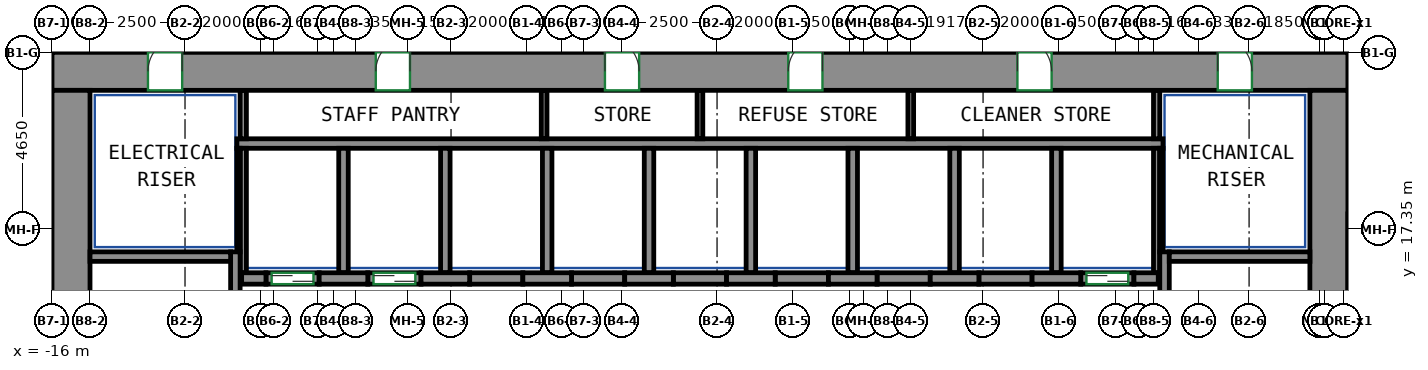
"""IFC4 building model, lengths in metres.
Left out: names, types, materials, properties, quantities, classifications, styles, units other than length and angle.
Written with IfcOpenShell. Run it as: python <this file> out.ifc"""

import sys

from ifc_helpers import new_model, si_unit, direction, frame, frame_2d, origin, place, context, subcontext, project, spatial, rectangle, extrude, source, transform, mapped, element, fill, save


model = new_model("IFC4")
c1 = context("Model", 3, precision=1e-05, world=origin(), true_north=direction((0.0, 1.0)))
c2 = subcontext(c1, "Body", "Model", "MODEL_VIEW")
j1 = project(units=[si_unit("LENGTHUNIT", "METRE"), si_unit("PLANEANGLEUNIT", "RADIAN")], contexts=[c1])
p1 = place(None, origin())
s1 = spatial("IfcSite", under=j1, at=p1, CompositionType="ELEMENT")
p2 = place(p1, origin())
s2 = spatial("IfcBuilding", under=s1, at=p2, CompositionType="ELEMENT")
p3 = place(p2, frame((0.0, 0.0, 67.2)))
s3 = spatial("IfcBuildingStorey", under=s2, at=p3, CompositionType="ELEMENT", Elevation=67.2)
m1 = source(origin(), c2, "Body", "SweptSolid", [
    extrude(rectangle(XDim=34.1, YDim=1.0, at=frame_2d((17.05, 0.0))), origin(), (0.0, 0.0, 1.0), 3.72),
])
p4 = place(p3, frame((-16.0, 21.5, 0.0), z_axis=(0.0, 0.0, 1.0), x_axis=(1.0, 0.0, 0.0)))
e1 = element("IfcWall", 1, at=p4, inside=s3, PredefinedType="SHEAR", context=c2, shape_type="MappedRepresentation", body=[
    mapped(m1, transform((0.0, 0.0, 0.0))),
])
p5 = place(p4, frame((8.52, 0.0, 0.0)))
e2 = element("IfcOpeningElement", 2, at=p5, cuts=e1, PredefinedType="OPENING", context=c2, shape_type="SweptSolid", body=[
    extrude(rectangle(XDim=0.9, YDim=2.1, at=frame_2d((0.45, 1.05))), frame((0.0, 0.51, 0.0), z_axis=(0.0, -1.0, 0.0), x_axis=(1.0, 0.0, 0.0)), (0.0, 0.0, 1.0), 1.02),
])
p6 = place(p4, frame((14.55, 0.0, 0.0)))
e3 = element("IfcOpeningElement", 3, at=p6, cuts=e1, PredefinedType="OPENING", context=c2, shape_type="SweptSolid", body=[
    extrude(rectangle(XDim=0.9, YDim=2.1, at=frame_2d((0.45, 1.05))), frame((0.0, 0.51, 0.0), z_axis=(0.0, -1.0, 0.0), x_axis=(1.0, 0.0, 0.0)), (0.0, 0.0, 1.0), 1.02),
])
p7 = place(p4, frame((19.374, 0.0, 0.0)))
e4 = element("IfcOpeningElement", 4, at=p7, cuts=e1, PredefinedType="OPENING", context=c2, shape_type="SweptSolid", body=[
    extrude(rectangle(XDim=0.9, YDim=2.1, at=frame_2d((0.45, 1.05))), frame((0.0, 0.51, 0.0), z_axis=(0.0, -1.0, 0.0), x_axis=(1.0, 0.0, 0.0)), (0.0, 0.0, 1.0), 1.02),
])
p8 = place(p4, frame((25.404, 0.0, 0.0)))
e5 = element("IfcOpeningElement", 5, at=p8, cuts=e1, PredefinedType="OPENING", context=c2, shape_type="SweptSolid", body=[
    extrude(rectangle(XDim=0.9, YDim=2.1, at=frame_2d((0.45, 1.05))), frame((0.0, 0.51, 0.0), z_axis=(0.0, -1.0, 0.0), x_axis=(1.0, 0.0, 0.0)), (0.0, 0.0, 1.0), 1.02),
])
p9 = place(p4, frame((2.525, 0.0, 0.0)))
e6 = element("IfcOpeningElement", 6, at=p9, cuts=e1, PredefinedType="OPENING", context=c2, shape_type="SweptSolid", body=[
    extrude(rectangle(XDim=0.9, YDim=2.1, at=frame_2d((0.45, 1.05))), frame((0.0, 0.51, 0.0), z_axis=(0.0, -1.0, 0.0), x_axis=(1.0, 0.0, 0.0)), (0.0, 0.0, 1.0), 1.02),
])
p10 = place(p4, frame((30.675, 0.0, 0.0)))
e7 = element("IfcOpeningElement", 7, at=p10, cuts=e1, PredefinedType="OPENING", context=c2, shape_type="SweptSolid", body=[
    extrude(rectangle(XDim=0.9, YDim=2.1, at=frame_2d((0.45, 1.05))), frame((0.0, 0.51, 0.0), z_axis=(0.0, -1.0, 0.0), x_axis=(1.0, 0.0, 0.0)), (0.0, 0.0, 1.0), 1.02),
])
m2 = source(origin(), c2, "Body", "SweptSolid", [
    extrude(rectangle(XDim=12.0, YDim=1.0, at=frame_2d((6.0, 0.0))), origin(), (0.0, 0.0, 1.0), 3.72),
])
for number, where, z_axis, x_axis in (
    (8, (-15.5, 9.0, 0.0), (0.0, 0.0, 1.0), (0.0, 1.0, 0.0)),
    (9, (17.6, 9.0, 0.0), (0.0, 0.0, 1.0), (0.0, 1.0, 0.0)),
):
    element("IfcWall", number, at=place(p3, frame(where, z_axis=z_axis, x_axis=x_axis)), inside=s3, PredefinedType="SHEAR", context=c2, shape_type="MappedRepresentation", body=[
        mapped(m2, transform((0.0, 0.0, 0.0))),
    ])
m3 = source(origin(), c2, "Body", "SweptSolid", [
    extrude(rectangle(XDim=7.75, YDim=0.25, at=frame_2d((3.875, 0.0))), origin(), (0.0, 0.0, 1.0), 3.72),
])
p11 = place(p3, frame((-11.175, 9.0, 0.0), z_axis=(0.0, 0.0, 1.0), x_axis=(0.0, 1.0, 0.0)))
e10 = element("IfcWall", 10, at=p11, inside=s3, PredefinedType="SHEAR", context=c2, shape_type="MappedRepresentation", body=[
    mapped(m3, transform((0.0, 0.0, 0.0))),
])
m4 = source(origin(), c2, "Body", "SweptSolid", [
    extrude(rectangle(XDim=3.7, YDim=0.25, at=frame_2d((1.85, 0.0))), origin(), (0.0, 0.0, 1.0), 3.72),
])
p12 = place(p3, frame((-15.0, 16.625, 0.0), z_axis=(0.0, 0.0, 1.0), x_axis=(1.0, 0.0, 0.0)))
e11 = element("IfcWall", 11, at=p12, inside=s3, PredefinedType="SHEAR", context=c2, shape_type="MappedRepresentation", body=[
    mapped(m4, transform((0.0, 0.0, 0.0))),
])
p13 = place(p3, frame((13.275, 9.0, 0.0), z_axis=(0.0, 0.0, 1.0), x_axis=(0.0, 1.0, 0.0)))
e12 = element("IfcWall", 12, at=p13, inside=s3, PredefinedType="SHEAR", context=c2, shape_type="MappedRepresentation", body=[
    mapped(m3, transform((0.0, 0.0, 0.0))),
])
m5 = source(origin(), c2, "Body", "SweptSolid", [
    extrude(rectangle(XDim=3.7, YDim=0.25, at=frame_2d((1.85, 0.0))), origin(), (0.0, 0.0, 1.0), 3.72),
])
p14 = place(p3, frame((13.4, 16.625, 0.0), z_axis=(0.0, 0.0, 1.0), x_axis=(1.0, 0.0, 0.0)))
e13 = element("IfcWall", 13, at=p14, inside=s3, PredefinedType="SHEAR", context=c2, shape_type="MappedRepresentation", body=[
    mapped(m5, transform((0.0, 0.0, 0.0))),
])
m6 = source(origin(), c2, "Body", "SweptSolid", [
    extrude(rectangle(XDim=0.64, YDim=0.3, at=frame_2d((0.32, 0.0))), origin(), (0.0, 0.0, 1.0), 3.72),
])
p15 = place(p3, frame((-11.01, 16.05, 0.0), z_axis=(0.0, 0.0, 1.0), x_axis=(1.0, 0.0, 0.0)))
e14 = element("IfcWall", 14, at=p15, inside=s3, PredefinedType="SHEAR", context=c2, shape_type="MappedRepresentation", body=[
    mapped(m6, transform((0.0, 0.0, 0.0))),
])
m7 = source(origin(), c2, "Body", "SweptSolid", [
    extrude(rectangle(XDim=1.28, YDim=0.3, at=frame_2d((0.64, 0.0))), origin(), (0.0, 0.0, 1.0), 3.72),
])
for number, where, z_axis, x_axis in (
    (15, (-8.97, 16.05, 0.0), (0.0, 0.0, 1.0), (1.0, 0.0, 0.0)),
    (16, (-6.29, 16.05, 0.0), (0.0, 0.0, 1.0), (1.0, 0.0, 0.0)),
    (17, (-3.61, 16.05, 0.0), (0.0, 0.0, 1.0), (1.0, 0.0, 0.0)),
    (18, (-0.93, 16.05, 0.0), (0.0, 0.0, 1.0), (1.0, 0.0, 0.0)),
    (19, (1.75, 16.05, 0.0), (0.0, 0.0, 1.0), (1.0, 0.0, 0.0)),
    (20, (4.43, 16.05, 0.0), (0.0, 0.0, 1.0), (1.0, 0.0, 0.0)),
):
    element("IfcWall", number, at=place(p3, frame(where, z_axis=z_axis, x_axis=x_axis)), inside=s3, PredefinedType="SHEAR", context=c2, shape_type="MappedRepresentation", body=[
        mapped(m7, transform((0.0, 0.0, 0.0))),
    ])
m8 = source(origin(), c2, "Body", "SweptSolid", [
    extrude(rectangle(XDim=1.28, YDim=0.3, at=frame_2d((0.64, 0.0))), origin(), (0.0, 0.0, 1.0), 3.72),
])
p16 = place(p3, frame((7.11, 16.05, 0.0), z_axis=(0.0, 0.0, 1.0), x_axis=(1.0, 0.0, 0.0)))
e21 = element("IfcWall", 21, at=p16, inside=s3, PredefinedType="SHEAR", context=c2, shape_type="MappedRepresentation", body=[
    mapped(m8, transform((0.0, 0.0, 0.0))),
])
p17 = place(p3, frame((9.79, 16.05, 0.0), z_axis=(0.0, 0.0, 1.0), x_axis=(1.0, 0.0, 0.0)))
e22 = element("IfcWall", 22, at=p17, inside=s3, PredefinedType="SHEAR", context=c2, shape_type="MappedRepresentation", body=[
    mapped(m7, transform((0.0, 0.0, 0.0))),
])
m9 = source(origin(), c2, "Body", "SweptSolid", [
    extrude(rectangle(XDim=0.64, YDim=0.3, at=frame_2d((0.32, 0.0))), origin(), (0.0, 0.0, 1.0), 3.72),
])
p18 = place(p3, frame((12.47, 16.05, 0.0), z_axis=(0.0, 0.0, 1.0), x_axis=(1.0, 0.0, 0.0)))
e23 = element("IfcWall", 23, at=p18, inside=s3, PredefinedType="SHEAR", context=c2, shape_type="MappedRepresentation", body=[
    mapped(m9, transform((0.0, 0.0, 0.0))),
])
m10 = source(origin(), c2, "Body", "SweptSolid", [
    extrude(rectangle(XDim=1.4, YDim=0.3, at=frame_2d((0.7, 0.0))), origin(), (0.0, 0.0, 1.0), 3.72),
])
p19 = place(p3, frame((11.07, 16.05, 0.0), z_axis=(0.0, 0.0, 1.0), x_axis=(1.0, 0.0, 0.0)))
e24 = element("IfcWall", 24, at=p19, inside=s3, PredefinedType="PARTITIONING", context=c2, shape_type="MappedRepresentation", body=[
    mapped(m10, transform((0.0, 0.0, 0.0))),
])
p20 = place(p19, frame((0.15, 0.0, 0.0)))
e25 = element("IfcOpeningElement", 25, at=p20, cuts=e24, PredefinedType="OPENING", context=c2, shape_type="SweptSolid", body=[
    extrude(rectangle(XDim=1.1, YDim=2.1, at=frame_2d((0.55, 1.05))), frame((0.0, 0.16, 0.0), z_axis=(0.0, -1.0, 0.0), x_axis=(1.0, 0.0, 0.0)), (0.0, 0.0, 1.0), 0.32),
])
m11 = source(origin(), c2, "Body", "SweptSolid", [
    extrude(rectangle(XDim=1.4, YDim=0.3, at=frame_2d((0.7, 0.0))), origin(), (0.0, 0.0, 1.0), 3.72),
])
p21 = place(p3, frame((-10.37, 16.05, 0.0), z_axis=(0.0, 0.0, 1.0), x_axis=(1.0, 0.0, 0.0)))
e26 = element("IfcWall", 26, at=p21, inside=s3, PredefinedType="PARTITIONING", context=c2, shape_type="MappedRepresentation", body=[
    mapped(m11, transform((0.0, 0.0, 0.0))),
])
p22 = place(p21, frame((0.15, 0.0, 0.0)))
e27 = element("IfcOpeningElement", 27, at=p22, cuts=e26, PredefinedType="OPENING", context=c2, shape_type="SweptSolid", body=[
    extrude(rectangle(XDim=1.1, YDim=2.1, at=frame_2d((0.55, 1.05))), frame((0.0, 0.16, 0.0), z_axis=(0.0, -1.0, 0.0), x_axis=(1.0, 0.0, 0.0)), (0.0, 0.0, 1.0), 0.32),
])
p23 = place(p3, frame((-7.69, 16.05, 0.0), z_axis=(0.0, 0.0, 1.0), x_axis=(1.0, 0.0, 0.0)))
e28 = element("IfcWall", 28, at=p23, inside=s3, PredefinedType="PARTITIONING", context=c2, shape_type="MappedRepresentation", body=[
    mapped(m10, transform((0.0, 0.0, 0.0))),
])
p24 = place(p23, frame((0.15, 0.0, 0.0)))
e29 = element("IfcOpeningElement", 29, at=p24, cuts=e28, PredefinedType="OPENING", context=c2, shape_type="SweptSolid", body=[
    extrude(rectangle(XDim=1.1, YDim=2.1, at=frame_2d((0.55, 1.05))), frame((0.0, 0.16, 0.0), z_axis=(0.0, -1.0, 0.0), x_axis=(1.0, 0.0, 0.0)), (0.0, 0.0, 1.0), 0.32),
])
p25 = place(p3, frame((-5.01, 16.05, 0.0), z_axis=(0.0, 0.0, 1.0), x_axis=(1.0, 0.0, 0.0)))
e30 = element("IfcWall", 30, at=p25, inside=s3, PredefinedType="PARTITIONING", context=c2, shape_type="MappedRepresentation", body=[
    mapped(m10, transform((0.0, 0.0, 0.0))),
])
p26 = place(p3, frame((-2.33, 16.05, 0.0), z_axis=(0.0, 0.0, 1.0), x_axis=(1.0, 0.0, 0.0)))
e31 = element("IfcWall", 31, at=p26, inside=s3, PredefinedType="PARTITIONING", context=c2, shape_type="MappedRepresentation", body=[
    mapped(m11, transform((0.0, 0.0, 0.0))),
])
for number, where, z_axis, x_axis in (
    (32, (0.35, 16.05, 0.0), (0.0, 0.0, 1.0), (1.0, 0.0, 0.0)),
    (33, (3.03, 16.05, 0.0), (0.0, 0.0, 1.0), (1.0, 0.0, 0.0)),
):
    element("IfcWall", number, at=place(p3, frame(where, z_axis=z_axis, x_axis=x_axis)), inside=s3, PredefinedType="PARTITIONING", context=c2, shape_type="MappedRepresentation", body=[
        mapped(m10, transform((0.0, 0.0, 0.0))),
    ])
for number, where, z_axis, x_axis in (
    (34, (5.71, 16.05, 0.0), (0.0, 0.0, 1.0), (1.0, 0.0, 0.0)),
    (35, (8.39, 16.05, 0.0), (0.0, 0.0, 1.0), (1.0, 0.0, 0.0)),
):
    element("IfcWall", number, at=place(p3, frame(where, z_axis=z_axis, x_axis=x_axis)), inside=s3, PredefinedType="PARTITIONING", context=c2, shape_type="MappedRepresentation", body=[
        mapped(m11, transform((0.0, 0.0, 0.0))),
    ])
m12 = source(origin(), c2, "Body", "SweptSolid", [
    extrude(rectangle(XDim=24.37, YDim=0.25, at=frame_2d((12.185, 0.0))), origin(), (0.0, 0.0, 1.0), 3.72),
])
p27 = place(p3, frame((-11.135, 19.6, 0.0), z_axis=(0.0, 0.0, 1.0), x_axis=(1.0, 0.0, 0.0)))
e36 = element("IfcWall", 36, at=p27, inside=s3, PredefinedType="PARTITIONING", context=c2, shape_type="MappedRepresentation", body=[
    mapped(m12, transform((0.0, 0.0, 0.0))),
])
m13 = source(origin(), c2, "Body", "SweptSolid", [
    extrude(rectangle(XDim=3.275, YDim=0.165, at=frame_2d((1.638, 0.0))), origin(), (0.0, 0.0, 1.0), 3.72),
])
p28 = place(p3, frame((13.067, 16.2, 0.0), z_axis=(0.0, 0.0, 1.0), x_axis=(0.0, 1.0, 0.0)))
e37 = element("IfcWall", 37, at=p28, inside=s3, PredefinedType="PARTITIONING", context=c2, shape_type="MappedRepresentation", body=[
    mapped(m13, transform((0.0, 0.0, 0.0))),
])
m14 = source(origin(), c2, "Body", "SweptSolid", [
    extrude(rectangle(XDim=1.275, YDim=0.165, at=frame_2d((0.637, 0.0))), origin(), (0.0, 0.0, 1.0), 3.72),
])
p29 = place(p3, frame((13.067, 19.725, 0.0), z_axis=(0.0, 0.0, 1.0), x_axis=(0.0, 1.0, 0.0)))
e38 = element("IfcWall", 38, at=p29, inside=s3, PredefinedType="PARTITIONING", context=c2, shape_type="MappedRepresentation", body=[
    mapped(m14, transform((0.0, 0.0, 0.0))),
])
p30 = place(p3, frame((-10.968, 16.2, 0.0), z_axis=(0.0, 0.0, 1.0), x_axis=(0.0, 1.0, 0.0)))
e39 = element("IfcWall", 39, at=p30, inside=s3, PredefinedType="PARTITIONING", context=c2, shape_type="MappedRepresentation", body=[
    mapped(m13, transform((0.0, 0.0, 0.0))),
])
p31 = place(p3, frame((-10.968, 19.725, 0.0), z_axis=(0.0, 0.0, 1.0), x_axis=(0.0, 1.0, 0.0)))
e40 = element("IfcWall", 40, at=p31, inside=s3, PredefinedType="PARTITIONING", context=c2, shape_type="MappedRepresentation", body=[
    mapped(m14, transform((0.0, 0.0, 0.0))),
])
m15 = source(origin(), c2, "Body", "SweptSolid", [
    extrude(rectangle(XDim=3.275, YDim=0.25, at=frame_2d((1.638, 0.0))), origin(), (0.0, 0.0, 1.0), 3.72),
])
p32 = place(p3, frame((10.43, 16.2, 0.0), z_axis=(0.0, 0.0, 1.0), x_axis=(0.0, 1.0, 0.0)))
e41 = element("IfcWall", 41, at=p32, inside=s3, PredefinedType="PARTITIONING", context=c2, shape_type="MappedRepresentation", body=[
    mapped(m15, transform((0.0, 0.0, 0.0))),
])
m16 = source(origin(), c2, "Body", "SweptSolid", [
    extrude(rectangle(XDim=2.725, YDim=0.085, at=frame_2d((1.363, 0.0))), origin(), (0.0, 0.0, 1.0), 3.72),
])
p33 = place(p3, frame((13.192, 16.75, 0.0), z_axis=(0.0, 0.0, 1.0), x_axis=(0.0, 1.0, 0.0)))
e42 = element("IfcWall", 42, at=p33, inside=s3, PredefinedType="PARTITIONING", context=c2, shape_type="MappedRepresentation", body=[
    mapped(m16, transform((0.0, 0.0, 0.0))),
])
for number, where, z_axis, x_axis in (
    (43, (2.39, 16.2, 0.0), (0.0, 0.0, 1.0), (0.0, 1.0, 0.0)),
    (44, (5.07, 16.2, 0.0), (0.0, 0.0, 1.0), (0.0, 1.0, 0.0)),
    (45, (7.75, 16.2, 0.0), (0.0, 0.0, 1.0), (0.0, 1.0, 0.0)),
    (46, (-0.29, 16.2, 0.0), (0.0, 0.0, 1.0), (0.0, 1.0, 0.0)),
):
    element("IfcWall", number, at=place(p3, frame(where, z_axis=z_axis, x_axis=x_axis)), inside=s3, PredefinedType="PARTITIONING", context=c2, shape_type="MappedRepresentation", body=[
        mapped(m15, transform((0.0, 0.0, 0.0))),
    ])
p34 = place(p3, frame((-11.093, 16.75, 0.0), z_axis=(0.0, 0.0, 1.0), x_axis=(0.0, 1.0, 0.0)))
e47 = element("IfcWall", 47, at=p34, inside=s3, PredefinedType="PARTITIONING", context=c2, shape_type="MappedRepresentation", body=[
    mapped(m16, transform((0.0, 0.0, 0.0))),
])
for number, where, z_axis, x_axis in (
    (48, (-2.97, 16.2, 0.0), (0.0, 0.0, 1.0), (0.0, 1.0, 0.0)),
    (49, (-5.65, 16.2, 0.0), (0.0, 0.0, 1.0), (0.0, 1.0, 0.0)),
    (50, (-8.33, 16.2, 0.0), (0.0, 0.0, 1.0), (0.0, 1.0, 0.0)),
):
    element("IfcWall", number, at=place(p3, frame(where, z_axis=z_axis, x_axis=x_axis)), inside=s3, PredefinedType="PARTITIONING", context=c2, shape_type="MappedRepresentation", body=[
        mapped(m15, transform((0.0, 0.0, 0.0))),
    ])
m17 = source(origin(), c2, "Body", "SweptSolid", [
    extrude(rectangle(XDim=1.275, YDim=0.15, at=frame_2d((0.637, 0.0))), origin(), (0.0, 0.0, 1.0), 3.72),
])
for number, where, z_axis, x_axis in (
    (51, (-3.05, 19.725, 0.0), (0.0, 0.0, 1.0), (0.0, 1.0, 0.0)),
    (52, (1.05, 19.725, 0.0), (0.0, 0.0, 1.0), (0.0, 1.0, 0.0)),
    (53, (6.598, 19.725, 0.0), (0.0, 0.0, 1.0), (0.0, 1.0, 0.0)),
):
    element("IfcWall", number, at=place(p3, frame(where, z_axis=z_axis, x_axis=x_axis)), inside=s3, PredefinedType="PARTITIONING", context=c2, shape_type="MappedRepresentation", body=[
        mapped(m17, transform((0.0, 0.0, 0.0))),
    ])
p35 = place(p20, origin())
e54 = element("IfcDoor", 54, at=p35, inside=s3, OperationType="DOUBLE_DOOR_SLIDING", PredefinedType="DOOR", context=c2, shape_type="SweptSolid", body=[
    extrude(rectangle(XDim=1.1, YDim=2.1, at=frame_2d((0.55, 1.05))), frame((0.0, 0.025, 0.0), z_axis=(0.0, -1.0, 0.0), x_axis=(1.0, 0.0, 0.0)), (0.0, 0.0, 1.0), 0.05),
])
fill(e25, e54)
p36 = place(p22, origin())
e55 = element("IfcDoor", 55, at=p36, inside=s3, OperationType="DOUBLE_DOOR_SLIDING", PredefinedType="DOOR", context=c2, shape_type="SweptSolid", body=[
    extrude(rectangle(XDim=1.1, YDim=2.1, at=frame_2d((0.55, 1.05))), frame((0.0, 0.025, 0.0), z_axis=(0.0, -1.0, 0.0), x_axis=(1.0, 0.0, 0.0)), (0.0, 0.0, 1.0), 0.05),
])
fill(e27, e55)
p37 = place(p24, origin())
e56 = element("IfcDoor", 56, at=p37, inside=s3, OperationType="DOUBLE_DOOR_SLIDING", PredefinedType="DOOR", context=c2, shape_type="SweptSolid", body=[
    extrude(rectangle(XDim=1.1, YDim=2.1, at=frame_2d((0.55, 1.05))), frame((0.0, 0.025, 0.0), z_axis=(0.0, -1.0, 0.0), x_axis=(1.0, 0.0, 0.0)), (0.0, 0.0, 1.0), 0.05),
])
fill(e29, e56)
p38 = place(p5, origin())
e57 = element("IfcDoor", 57, at=p38, inside=s3, OperationType="SINGLE_SWING_RIGHT", PredefinedType="DOOR", context=c2, shape_type="SweptSolid", body=[
    extrude(rectangle(XDim=0.9, YDim=2.1, at=frame_2d((0.45, 1.05))), frame((0.0, -0.355, 0.0), z_axis=(0.0, -1.0, 0.0), x_axis=(1.0, 0.0, 0.0)), (0.0, 0.0, 1.0), 0.05),
])
fill(e2, e57)
p39 = place(p6, origin())
e58 = element("IfcDoor", 58, at=p39, inside=s3, OperationType="SINGLE_SWING_LEFT", PredefinedType="DOOR", context=c2, shape_type="SweptSolid", body=[
    extrude(rectangle(XDim=0.9, YDim=2.1, at=frame_2d((0.45, 1.05))), frame((0.0, -0.355, 0.0), z_axis=(0.0, -1.0, 0.0), x_axis=(1.0, 0.0, 0.0)), (0.0, 0.0, 1.0), 0.05),
])
fill(e3, e58)
p40 = place(p7, origin())
e59 = element("IfcDoor", 59, at=p40, inside=s3, OperationType="SINGLE_SWING_RIGHT", PredefinedType="DOOR", context=c2, shape_type="SweptSolid", body=[
    extrude(rectangle(XDim=0.9, YDim=2.1, at=frame_2d((0.45, 1.05))), frame((0.0, -0.355, 0.0), z_axis=(0.0, -1.0, 0.0), x_axis=(1.0, 0.0, 0.0)), (0.0, 0.0, 1.0), 0.05),
])
fill(e4, e59)
p41 = place(p8, origin())
e60 = element("IfcDoor", 60, at=p41, inside=s3, OperationType="SINGLE_SWING_LEFT", PredefinedType="DOOR", context=c2, shape_type="SweptSolid", body=[
    extrude(rectangle(XDim=0.9, YDim=2.1, at=frame_2d((0.45, 1.05))), frame((0.0, -0.355, 0.0), z_axis=(0.0, -1.0, 0.0), x_axis=(1.0, 0.0, 0.0)), (0.0, 0.0, 1.0), 0.05),
])
fill(e5, e60)
p42 = place(p9, origin())
e61 = element("IfcDoor", 61, at=p42, inside=s3, OperationType="SINGLE_SWING_RIGHT", PredefinedType="DOOR", context=c2, shape_type="SweptSolid", body=[
    extrude(rectangle(XDim=0.9, YDim=2.1, at=frame_2d((0.45, 1.05))), frame((0.0, -0.355, 0.0), z_axis=(0.0, -1.0, 0.0), x_axis=(1.0, 0.0, 0.0)), (0.0, 0.0, 1.0), 0.05),
])
fill(e6, e61)
p43 = place(p10, origin())
e62 = element("IfcDoor", 62, at=p43, inside=s3, OperationType="SINGLE_SWING_LEFT", PredefinedType="DOOR", context=c2, shape_type="SweptSolid", body=[
    extrude(rectangle(XDim=0.9, YDim=2.1, at=frame_2d((0.45, 1.05))), frame((0.0, -0.355, 0.0), z_axis=(0.0, -1.0, 0.0), x_axis=(1.0, 0.0, 0.0)), (0.0, 0.0, 1.0), 0.05),
])
fill(e7, e62)
save(model, sys.argv[1])
